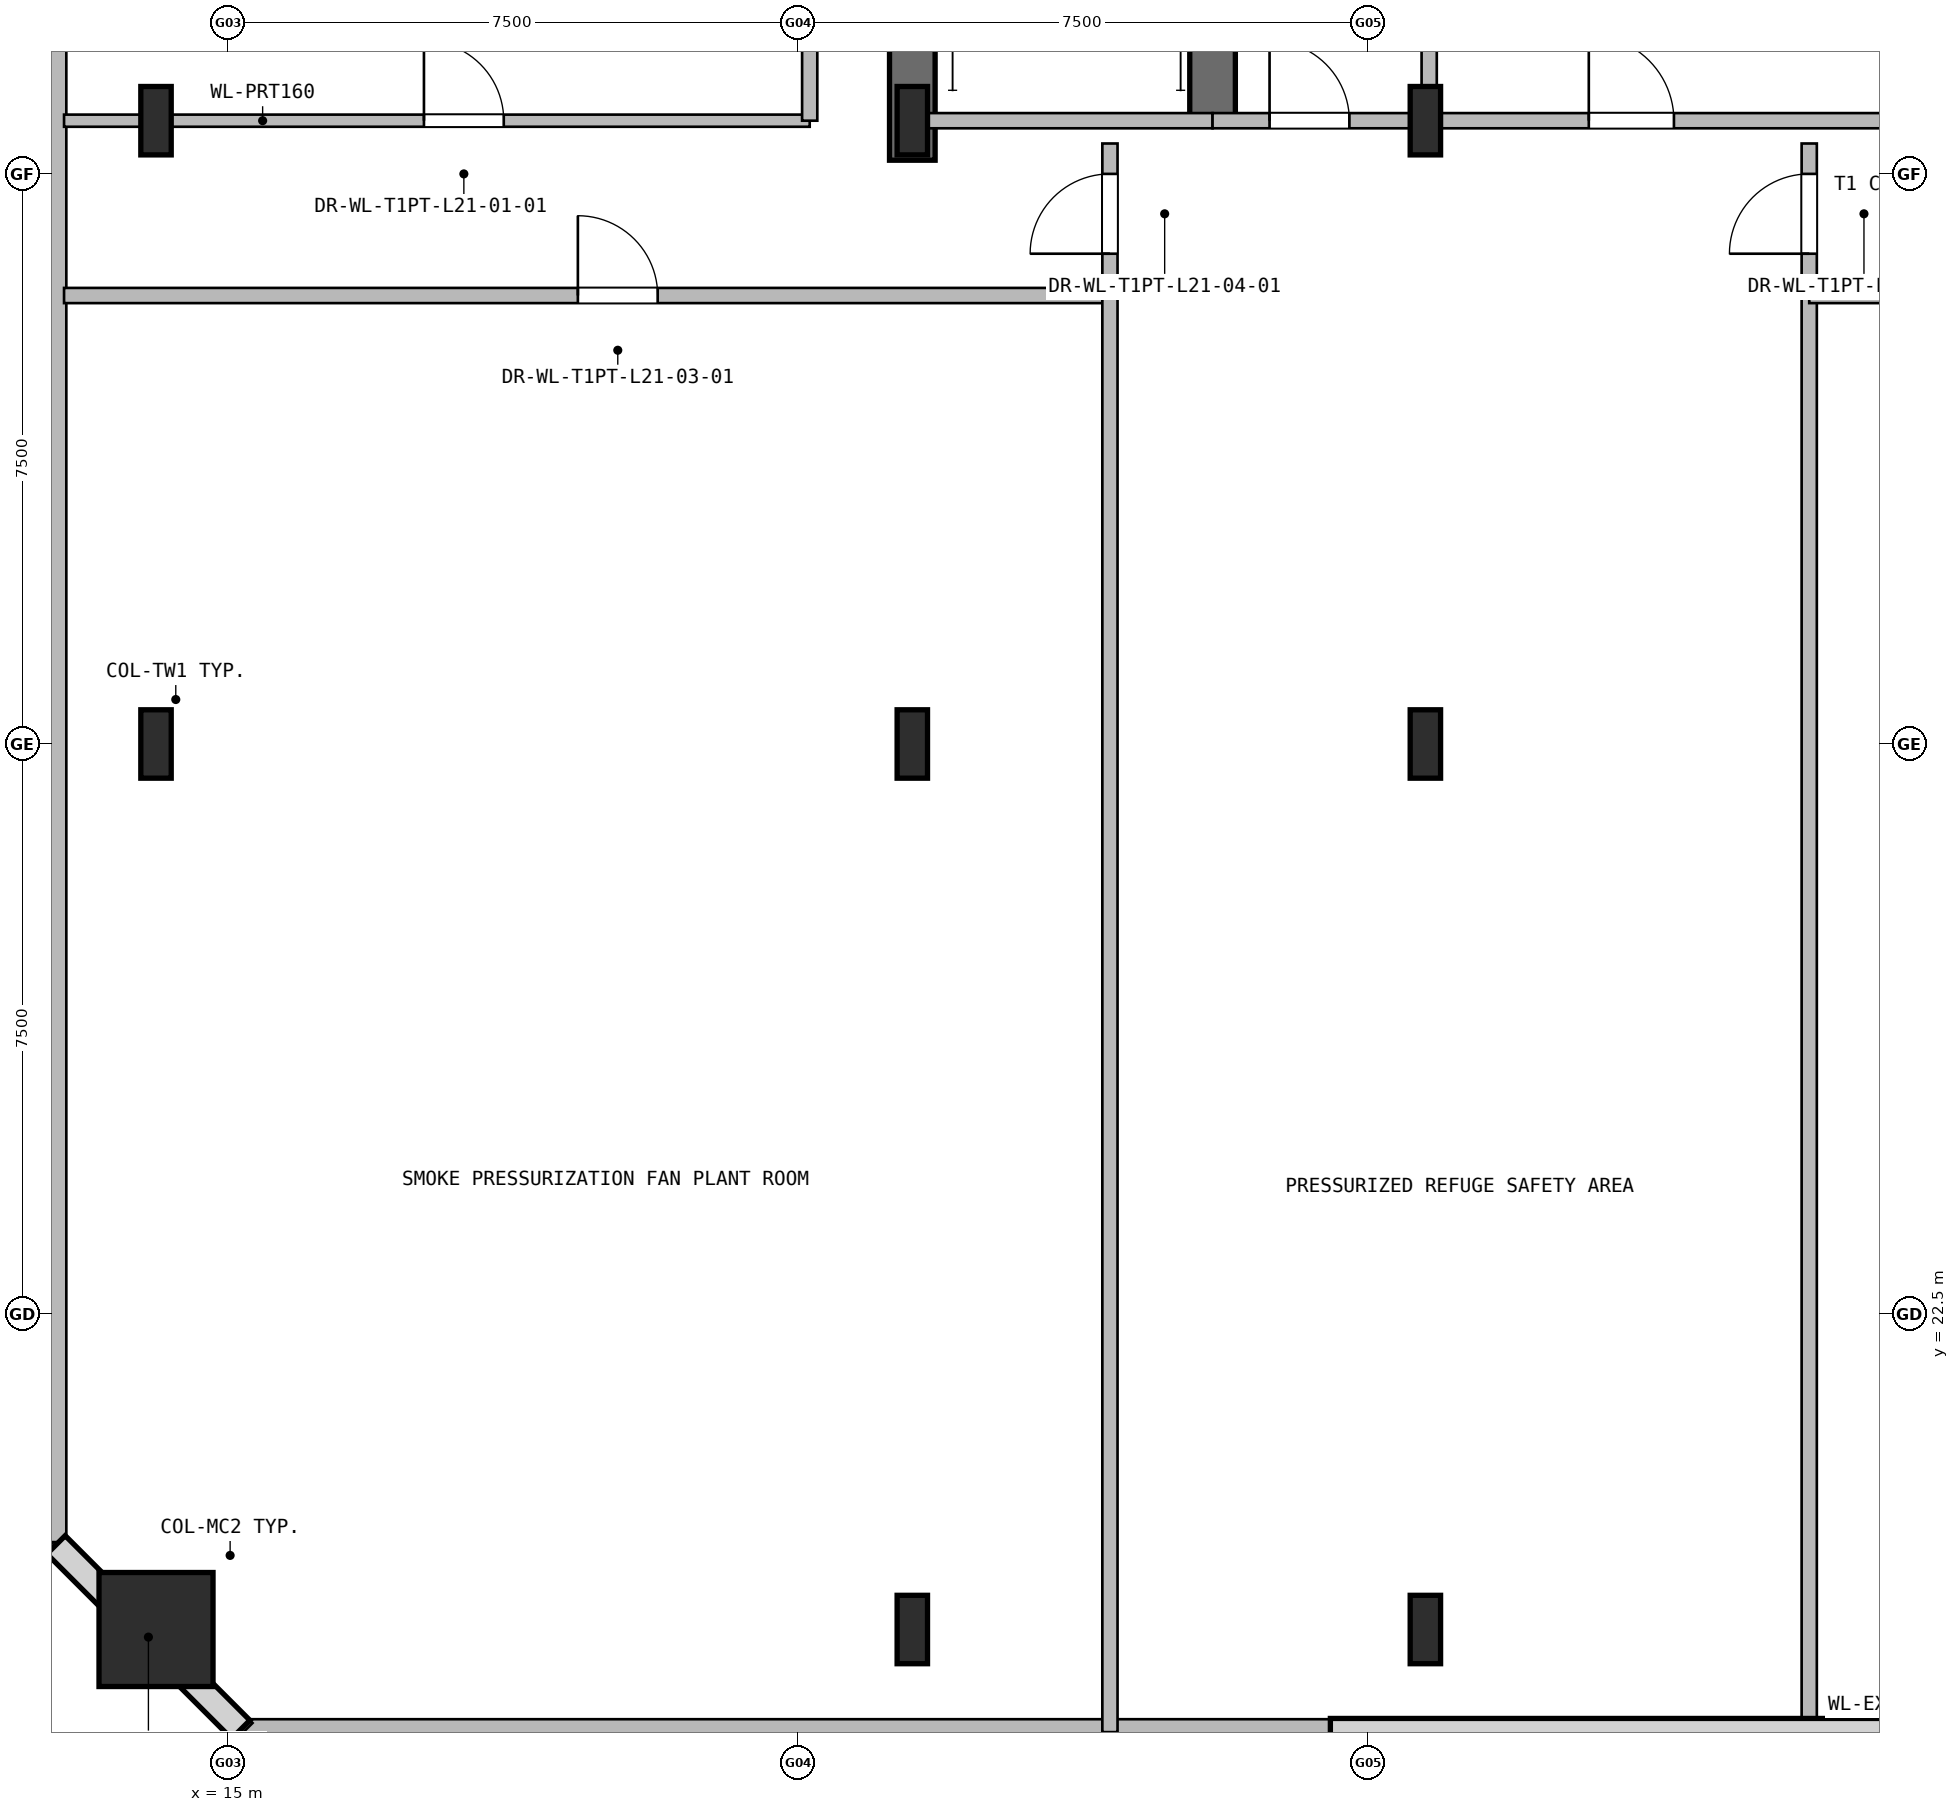
"""IFC4 building model, lengths in metres.
Left out: names, types, materials, properties, quantities, classifications, styles, units other than length and angle.
Written with IfcOpenShell. Run it as: python <this file> out.ifc"""

import sys

from ifc_helpers import new_model, si_unit, direction, frame, frame_2d, origin, origin_2d, place, context, subcontext, project, spatial, rectangle, hollow_rectangle, i_section, extrude, element, fill, save


model = new_model("IFC4")
c1 = context("Model", 3, precision=1e-05, world=origin(), true_north=direction((0.0, 1.0)))
c2 = subcontext(c1, "Body", "Model", "MODEL_VIEW")
j1 = project(units=[si_unit("LENGTHUNIT", "METRE"), si_unit("PLANEANGLEUNIT", "RADIAN")], contexts=[c1])
p1 = place(None, origin())
s1 = spatial("IfcSite", under=j1, at=p1, CompositionType="ELEMENT")
p2 = place(p1, origin())
s2 = spatial("IfcBuilding", under=s1, at=p2, CompositionType="ELEMENT")
p3 = place(p2, frame((0.0, 0.0, 81.9)))
s3 = spatial("IfcBuildingStorey", under=s2, at=p3, CompositionType="ELEMENT", Elevation=81.9)
p4 = place(p3, frame((24.0, 37.68, 0.0), z_axis=(0.0, 0.0, 1.0), x_axis=(0.0, 1.0, 0.0)))
e1 = element("IfcWall", 1, at=p4, inside=s3, PredefinedType="SHEAR", context=c2, shape_type="SweptSolid", body=[
    extrude(rectangle(XDim=10.32, YDim=0.6, at=frame_2d((5.16, 0.0))), origin(), (0.0, 0.0, 1.0), 4.8),
])
p5 = place(p3, frame((27.95, 38.2, 0.0), z_axis=(0.0, 0.0, 1.0), x_axis=(0.0, 1.0, 0.0)))
e2 = element("IfcWall", 2, at=p5, inside=s3, PredefinedType="SHEAR", context=c2, shape_type="SweptSolid", body=[
    extrude(rectangle(XDim=9.8, YDim=0.6, at=frame_2d((4.9, 0.0))), origin(), (0.0, 0.0, 1.0), 4.8),
])
p6 = place(p3, frame((14.05, 18.35, 0.0), z_axis=(0.0, 0.0, 1.0), x_axis=(1.0, 0.0, 0.0)))
e3 = element("IfcColumn", 3, at=p6, inside=s3, PredefinedType="COLUMN", context=c2, shape_type="SweptSolid", body=[
    extrude(hollow_rectangle(XDim=1.5, YDim=1.5, WallThickness=0.04, at=origin_2d()), origin(), (0.0, 0.0, 1.0), 4.8),
])
for number, where, z_axis, x_axis in (
    (4, (14.05, 30.0, 0.0), (0.0, 0.0, 1.0), (1.0, 0.0, 0.0)),
    (5, (14.05, 38.2, 0.0), (0.0, 0.0, 1.0), (1.0, 0.0, 0.0)),
    (6, (24.0, 18.35, 0.0), (0.0, 0.0, 1.0), (1.0, 0.0, 0.0)),
    (7, (24.0, 30.0, 0.0), (0.0, 0.0, 1.0), (1.0, 0.0, 0.0)),
    (8, (24.0, 38.2, 0.0), (0.0, 0.0, 1.0), (1.0, 0.0, 0.0)),
    (9, (30.75, 18.35, 0.0), (0.0, 0.0, 1.0), (1.0, 0.0, 0.0)),
    (10, (30.75, 30.0, 0.0), (0.0, 0.0, 1.0), (1.0, 0.0, 0.0)),
    (11, (30.75, 38.2, 0.0), (0.0, 0.0, 1.0), (1.0, 0.0, 0.0)),
):
    element("IfcColumn", number, at=place(p3, frame(where, z_axis=z_axis, x_axis=x_axis)), inside=s3, PredefinedType="COLUMN", context=c2, shape_type="SweptSolid", body=[
        extrude(i_section(OverallWidth=0.4, OverallDepth=0.9, WebThickness=0.02, FlangeThickness=0.036, at=origin_2d()), origin(), (0.0, 0.0, 1.0), 4.8),
    ])
p7 = place(p3, frame((59.8, 17.0, 0.0), z_axis=(0.0, 0.0, 1.0), x_axis=(-1.0, 0.0, 0.0)))
e12 = element("IfcWall", 12, at=p7, inside=s3, PredefinedType="SOLIDWALL", context=c2, shape_type="SweptSolid", body=[
    extrude(rectangle(XDim=44.6, YDim=0.34, at=frame_2d((22.3, 0.0))), origin(), (0.0, 0.0, 1.0), 4.53),
])
p8 = place(p3, frame((15.2, 17.0, 0.0), z_axis=(0.0, 0.0, 1.0), x_axis=(-0.707106781187, 0.707106781187, 0.0)))
e13 = element("IfcWall", 13, at=p8, inside=s3, PredefinedType="SOLIDWALL", context=c2, shape_type="SweptSolid", body=[
    extrude(rectangle(XDim=3.536, YDim=0.34, at=frame_2d((1.768, 0.0))), origin(), (0.0, 0.0, 1.0), 4.53),
])
p9 = place(p3, frame((12.7, 19.5, 0.0), z_axis=(0.0, 0.0, 1.0), x_axis=(0.0, 1.0, 0.0)))
e14 = element("IfcWall", 14, at=p9, inside=s3, PredefinedType="SOLIDWALL", context=c2, shape_type="SweptSolid", body=[
    extrude(rectangle(XDim=27.0, YDim=0.34, at=frame_2d((13.5, 0.0))), origin(), (0.0, 0.0, 1.0), 4.53),
])
p10 = place(p3, frame((24.0, 38.2, 0.0), z_axis=(0.0, 0.0, 1.0), x_axis=(1.0, 0.0, 0.0)))
e15 = element("IfcWall", 15, at=p10, inside=s3, PredefinedType="PARTITIONING", context=c2, shape_type="SweptSolid", body=[
    extrude(rectangle(XDim=3.95, YDim=0.2, at=frame_2d((1.975, 0.0))), origin(), (0.0, 0.0, 1.0), 3.83),
])
p11 = place(p3, frame((30.8, 38.2, 0.0), z_axis=(0.0, 0.0, 1.0), x_axis=(0.0, 1.0, 0.0)))
e16 = element("IfcWall", 16, at=p11, inside=s3, PredefinedType="PARTITIONING", context=c2, shape_type="SweptSolid", body=[
    extrude(rectangle(XDim=6.45, YDim=0.2, at=frame_2d((3.225, 0.0))), origin(), (0.0, 0.0, 1.0), 3.83),
])
p12 = place(p11, frame((3.1, 0.0, 0.0)))
e17 = element("IfcOpeningElement", 17, at=p12, cuts=e16, PredefinedType="OPENING", context=c2, shape_type="SweptSolid", body=[
    extrude(rectangle(XDim=1.05, YDim=2.1, at=frame_2d((0.525, 1.05))), frame((0.0, 0.11, 0.0), z_axis=(0.0, -1.0, 0.0), x_axis=(1.0, 0.0, 0.0)), (0.0, 0.0, 1.0), 0.22),
])
p13 = place(p3, frame((27.95, 38.2, 0.0), z_axis=(0.0, 0.0, 1.0), x_axis=(1.0, 0.0, 0.0)))
e18 = element("IfcWall", 18, at=p13, inside=s3, PredefinedType="PARTITIONING", context=c2, shape_type="SweptSolid", body=[
    extrude(rectangle(XDim=2.85, YDim=0.2, at=frame_2d((1.425, 0.0))), origin(), (0.0, 0.0, 1.0), 3.83),
])
p14 = place(p13, frame((0.75, 0.0, 0.0)))
e19 = element("IfcOpeningElement", 19, at=p14, cuts=e18, PredefinedType="OPENING", context=c2, shape_type="SweptSolid", body=[
    extrude(rectangle(XDim=1.05, YDim=2.1, at=frame_2d((0.525, 1.05))), frame((0.0, 0.11, 0.0), z_axis=(0.0, -1.0, 0.0), x_axis=(1.0, 0.0, 0.0)), (0.0, 0.0, 1.0), 0.22),
])
p15 = place(p3, frame((30.8, 38.2, 0.0), z_axis=(0.0, 0.0, 1.0), x_axis=(1.0, 0.0, 0.0)))
e20 = element("IfcWall", 20, at=p15, inside=s3, PredefinedType="PARTITIONING", context=c2, shape_type="SweptSolid", body=[
    extrude(rectangle(XDim=16.35, YDim=0.2, at=frame_2d((8.175, 0.0))), origin(), (0.0, 0.0, 1.0), 3.83),
])
p16 = place(p15, frame((2.1, 0.0, 0.0)))
e21 = element("IfcOpeningElement", 21, at=p16, cuts=e20, PredefinedType="OPENING", context=c2, shape_type="SweptSolid", body=[
    extrude(rectangle(XDim=1.12, YDim=2.1, at=frame_2d((0.56, 1.05))), frame((0.0, 0.11, 0.0), z_axis=(0.0, -1.0, 0.0), x_axis=(1.0, 0.0, 0.0)), (0.0, 0.0, 1.0), 0.22),
])
p17 = place(p15, frame((7.95, 0.0, 0.0)))
e22 = element("IfcOpeningElement", 22, at=p17, cuts=e20, PredefinedType="OPENING", context=c2, shape_type="SweptSolid", body=[
    extrude(rectangle(XDim=1.12, YDim=2.1, at=frame_2d((0.56, 1.05))), frame((0.0, 0.11, 0.0), z_axis=(0.0, -1.0, 0.0), x_axis=(1.0, 0.0, 0.0)), (0.0, 0.0, 1.0), 0.22),
])
p18 = place(p3, frame((12.84, 38.2, 0.0), z_axis=(0.0, 0.0, 1.0), x_axis=(1.0, 0.0, 0.0)))
e23 = element("IfcWall", 23, at=p18, inside=s3, PredefinedType="PARTITIONING", context=c2, shape_type="SweptSolid", body=[
    extrude(rectangle(XDim=9.81, YDim=0.16, at=frame_2d((4.905, 0.0))), origin(), (0.0, 0.0, 1.0), 3.83),
])
p19 = place(p18, frame((4.735, 0.0, 0.0)))
e24 = element("IfcOpeningElement", 24, at=p19, cuts=e23, PredefinedType="OPENING", context=c2, shape_type="SweptSolid", body=[
    extrude(rectangle(XDim=1.05, YDim=2.1, at=frame_2d((0.525, 1.05))), frame((0.0, 0.09, 0.0), z_axis=(0.0, -1.0, 0.0), x_axis=(1.0, 0.0, 0.0)), (0.0, 0.0, 1.0), 0.18),
])
p20 = place(p3, frame((22.65, 38.2, 0.0), z_axis=(0.0, 0.0, 1.0), x_axis=(0.0, 1.0, 0.0)))
e25 = element("IfcWall", 25, at=p20, inside=s3, PredefinedType="PARTITIONING", context=c2, shape_type="SweptSolid", body=[
    extrude(rectangle(XDim=10.66, YDim=0.2, at=frame_2d((5.33, 0.0))), origin(), (0.0, 0.0, 1.0), 4.53),
])
p21 = place(p3, frame((12.84, 35.9, 0.0), z_axis=(0.0, 0.0, 1.0), x_axis=(1.0, 0.0, 0.0)))
e26 = element("IfcWall", 26, at=p21, inside=s3, PredefinedType="PARTITIONING", context=c2, shape_type="SweptSolid", body=[
    extrude(rectangle(XDim=13.76, YDim=0.2, at=frame_2d((6.88, 0.0))), origin(), (0.0, 0.0, 1.0), 4.53),
])
p22 = place(p21, frame((6.76, 0.0, 0.0)))
e27 = element("IfcOpeningElement", 27, at=p22, cuts=e26, PredefinedType="OPENING", context=c2, shape_type="SweptSolid", body=[
    extrude(rectangle(XDim=1.05, YDim=2.1, at=frame_2d((0.525, 1.05))), frame((0.0, 0.11, 0.0), z_axis=(0.0, -1.0, 0.0), x_axis=(1.0, 0.0, 0.0)), (0.0, 0.0, 1.0), 0.22),
])
p23 = place(p3, frame((26.6, 17.0, 0.0), z_axis=(0.0, 0.0, 1.0), x_axis=(0.0, 1.0, 0.0)))
e28 = element("IfcWall", 28, at=p23, inside=s3, PredefinedType="PARTITIONING", context=c2, shape_type="SweptSolid", body=[
    extrude(rectangle(XDim=20.9, YDim=0.2, at=frame_2d((10.45, 0.0))), origin(), (0.0, 0.0, 1.0), 4.53),
])
p24 = place(p23, frame((19.45, 0.0, 0.0)))
e29 = element("IfcOpeningElement", 29, at=p24, cuts=e28, PredefinedType="OPENING", context=c2, shape_type="SweptSolid", body=[
    extrude(rectangle(XDim=1.05, YDim=2.1, at=frame_2d((0.525, 1.05))), frame((0.0, 0.11, 0.0), z_axis=(0.0, -1.0, 0.0), x_axis=(1.0, 0.0, 0.0)), (0.0, 0.0, 1.0), 0.22),
])
p25 = place(p3, frame((35.8, 17.0, 0.0), z_axis=(0.0, 0.0, 1.0), x_axis=(0.0, 1.0, 0.0)))
e30 = element("IfcWall", 30, at=p25, inside=s3, PredefinedType="PARTITIONING", context=c2, shape_type="SweptSolid", body=[
    extrude(rectangle(XDim=20.9, YDim=0.2, at=frame_2d((10.45, 0.0))), origin(), (0.0, 0.0, 1.0), 4.53),
])
p26 = place(p25, frame((19.45, 0.0, 0.0)))
e31 = element("IfcOpeningElement", 31, at=p26, cuts=e30, PredefinedType="OPENING", context=c2, shape_type="SweptSolid", body=[
    extrude(rectangle(XDim=1.05, YDim=2.1, at=frame_2d((0.525, 1.05))), frame((0.0, 0.11, 0.0), z_axis=(0.0, -1.0, 0.0), x_axis=(1.0, 0.0, 0.0)), (0.0, 0.0, 1.0), 0.22),
])
p27 = place(p3, frame((35.8, 35.9, 0.0), z_axis=(0.0, 0.0, 1.0), x_axis=(1.0, 0.0, 0.0)))
e32 = element("IfcWall", 32, at=p27, inside=s3, PredefinedType="PARTITIONING", context=c2, shape_type="SweptSolid", body=[
    extrude(rectangle(XDim=13.85, YDim=0.2, at=frame_2d((6.925, 0.0))), origin(), (0.0, 0.0, 1.0), 4.53),
])
p28 = place(p27, frame((2.9, 0.0, 0.0)))
e33 = element("IfcOpeningElement", 33, at=p28, cuts=e32, PredefinedType="OPENING", context=c2, shape_type="SweptSolid", body=[
    extrude(rectangle(XDim=1.05, YDim=2.1, at=frame_2d((0.525, 1.05))), frame((0.0, 0.11, 0.0), z_axis=(0.0, -1.0, 0.0), x_axis=(1.0, 0.0, 0.0)), (0.0, 0.0, 1.0), 0.22),
])
p29 = place(p27, frame((9.825, 0.0, 0.0)))
e34 = element("IfcOpeningElement", 34, at=p29, cuts=e32, PredefinedType="OPENING", context=c2, shape_type="SweptSolid", body=[
    extrude(rectangle(XDim=1.05, YDim=2.1, at=frame_2d((0.525, 1.05))), frame((0.0, 0.11, 0.0), z_axis=(0.0, -1.0, 0.0), x_axis=(1.0, 0.0, 0.0)), (0.0, 0.0, 1.0), 0.22),
])
p30 = place(p14, origin())
e35 = element("IfcDoor", 35, at=p30, inside=s3, OperationType="SINGLE_SWING_RIGHT", PredefinedType="DOOR", context=c2, shape_type="SweptSolid", body=[
    extrude(rectangle(XDim=1.05, YDim=2.1, at=frame_2d((0.525, 1.05))), frame((0.0, 0.025, 0.0), z_axis=(0.0, -1.0, 0.0), x_axis=(1.0, 0.0, 0.0)), (0.0, 0.0, 1.0), 0.05),
])
fill(e19, e35)
p31 = place(p16, origin())
e36 = element("IfcDoor", 36, at=p31, inside=s3, OperationType="SINGLE_SWING_LEFT", PredefinedType="DOOR", context=c2, shape_type="SweptSolid", body=[
    extrude(rectangle(XDim=1.12, YDim=2.1, at=frame_2d((0.56, 1.05))), frame((0.0, 0.025, 0.0), z_axis=(0.0, -1.0, 0.0), x_axis=(1.0, 0.0, 0.0)), (0.0, 0.0, 1.0), 0.05),
])
fill(e21, e36)
p32 = place(p19, origin())
e37 = element("IfcDoor", 37, at=p32, inside=s3, OperationType="SINGLE_SWING_RIGHT", PredefinedType="DOOR", context=c2, shape_type="SweptSolid", body=[
    extrude(rectangle(XDim=1.05, YDim=2.1, at=frame_2d((0.525, 1.05))), frame((0.0, 0.025, 0.0), z_axis=(0.0, -1.0, 0.0), x_axis=(1.0, 0.0, 0.0)), (0.0, 0.0, 1.0), 0.05),
])
fill(e24, e37)
p33 = place(p22, origin())
e38 = element("IfcDoor", 38, at=p33, inside=s3, OperationType="SINGLE_SWING_LEFT", PredefinedType="DOOR", context=c2, shape_type="SweptSolid", body=[
    extrude(rectangle(XDim=1.05, YDim=2.1, at=frame_2d((0.525, 1.05))), frame((0.0, 0.025, 0.0), z_axis=(0.0, -1.0, 0.0), x_axis=(1.0, 0.0, 0.0)), (0.0, 0.0, 1.0), 0.05),
])
fill(e27, e38)
p34 = place(p24, origin())
e39 = element("IfcDoor", 39, at=p34, inside=s3, OperationType="SINGLE_SWING_RIGHT", PredefinedType="DOOR", context=c2, shape_type="SweptSolid", body=[
    extrude(rectangle(XDim=1.05, YDim=2.1, at=frame_2d((0.525, 1.05))), frame((0.0, 0.025, 0.0), z_axis=(0.0, -1.0, 0.0), x_axis=(1.0, 0.0, 0.0)), (0.0, 0.0, 1.0), 0.05),
])
fill(e29, e39)
p35 = place(p26, origin())
e40 = element("IfcDoor", 40, at=p35, inside=s3, OperationType="SINGLE_SWING_LEFT", PredefinedType="DOOR", context=c2, shape_type="SweptSolid", body=[
    extrude(rectangle(XDim=1.05, YDim=2.1, at=frame_2d((0.525, 1.05))), frame((0.0, 0.025, 0.0), z_axis=(0.0, -1.0, 0.0), x_axis=(1.0, 0.0, 0.0)), (0.0, 0.0, 1.0), 0.05),
])
fill(e31, e40)
save(model, sys.argv[1])
